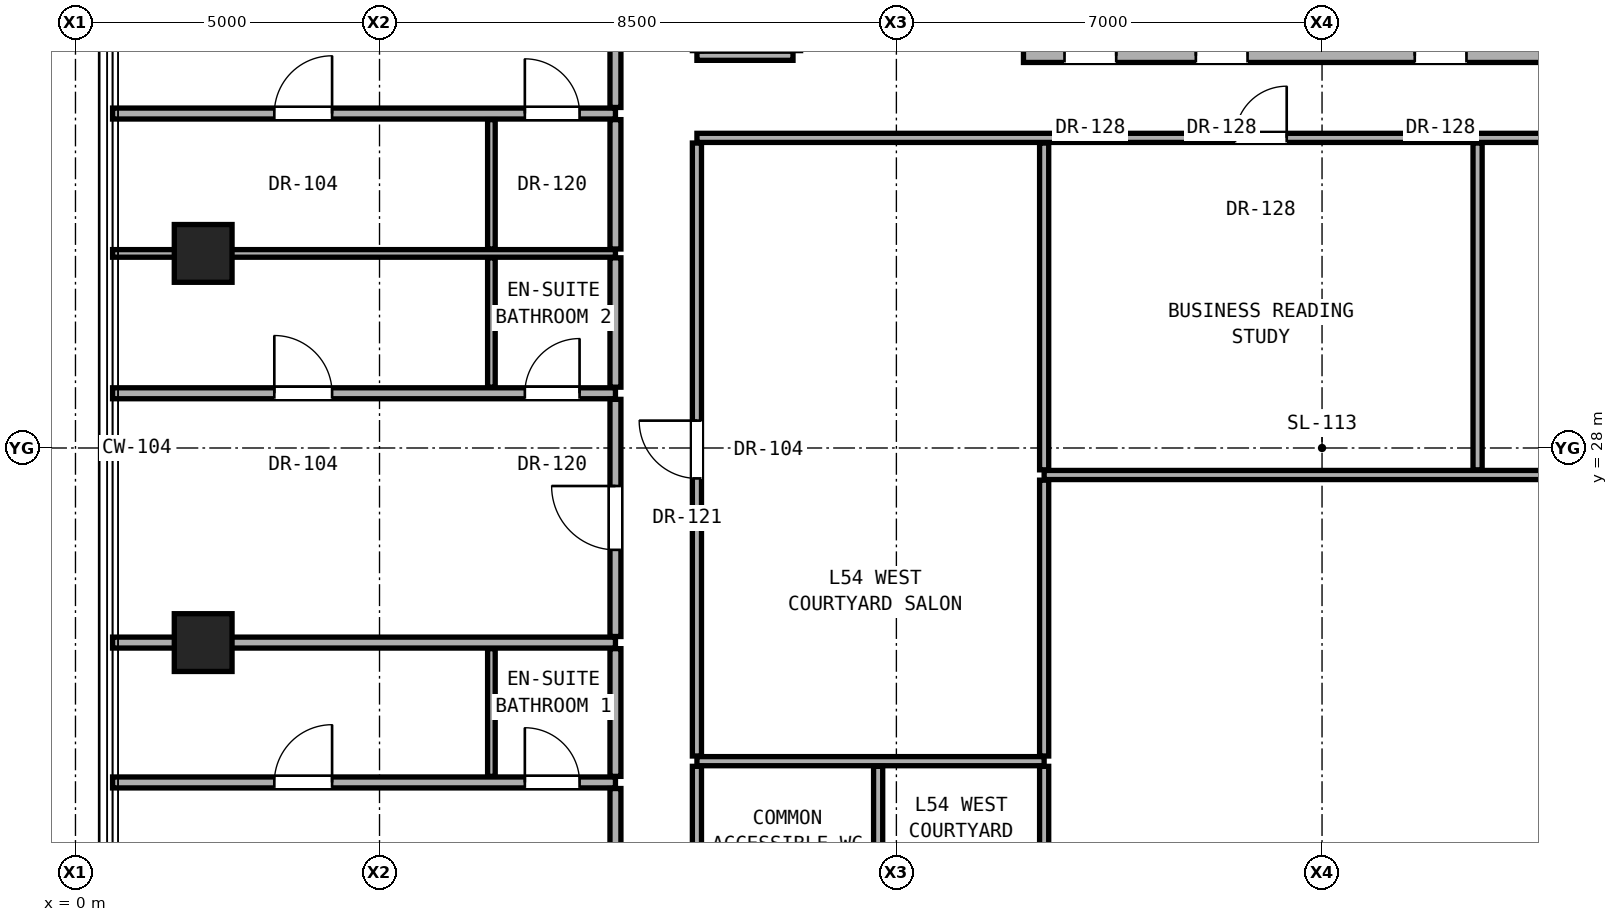
"""IFC4 building model, lengths in metres.
Left out: names, types, materials, properties, quantities, classifications, styles, units other than length and angle.
Written with IfcOpenShell. Run it as: python <this file> out.ifc"""

import sys

from ifc_helpers import new_model, si_unit, direction, frame, frame_2d, origin, origin_2d, place, context, subcontext, project, spatial, rectangle, hollow_rectangle, extrude, element, fill, save


model = new_model("IFC4")
c1 = context("Model", 3, precision=1e-05, world=origin(), true_north=direction((0.0, 1.0)))
c2 = subcontext(c1, "Body", "Model", "MODEL_VIEW")
j1 = project(units=[si_unit("LENGTHUNIT", "METRE"), si_unit("PLANEANGLEUNIT", "RADIAN")], contexts=[c1])
p1 = place(None, origin())
s1 = spatial("IfcSite", under=j1, at=p1, CompositionType="ELEMENT")
p2 = place(p1, origin())
s2 = spatial("IfcBuilding", under=s1, at=p2, CompositionType="ELEMENT")
p3 = place(p2, frame((0.0, 0.0, 190.15)))
s3 = spatial("IfcBuildingStorey", under=s2, at=p3, CompositionType="ELEMENT", Elevation=190.15)
for number, where, z_axis, x_axis in (
    (1, (2.1, 24.8, 0.0), (0.0, 0.0, 1.0), (1.0, 0.0, 0.0)),
    (2, (2.1, 31.2, 0.0), (0.0, 0.0, 1.0), (1.0, 0.0, 0.0)),
):
    element("IfcColumn", number, at=place(p3, frame(where, z_axis=z_axis, x_axis=x_axis)), inside=s3, PredefinedType="COLUMN", context=c2, shape_type="SweptSolid", body=[
        extrude(hollow_rectangle(XDim=0.95, YDim=0.95, WallThickness=0.05, at=origin_2d()), origin(), (0.0, 0.0, 1.0), 3.25),
    ])
p4 = place(p3, frame((0.61, 22.5, 0.0), z_axis=(0.0, 0.0, 1.0), x_axis=(1.0, 0.0, 0.0)))
e3 = element("IfcWall", 3, at=p4, inside=s3, PredefinedType="PARTITIONING", context=c2, shape_type="SweptSolid", body=[
    extrude(rectangle(XDim=8.27, YDim=0.18, at=frame_2d((4.135, 0.0))), origin(), (0.0, 0.0, 1.0), 2.269),
])
p5 = place(p4, frame((2.66, 0.0, 0.0)))
e4 = element("IfcOpeningElement", 4, at=p5, cuts=e3, PredefinedType="OPENING", context=c2, shape_type="SweptSolid", body=[
    extrude(rectangle(XDim=0.95, YDim=2.15, at=frame_2d((0.475, 1.075))), frame((0.0, 0.1, 0.0), z_axis=(0.0, -1.0, 0.0), x_axis=(1.0, 0.0, 0.0)), (0.0, 0.0, 1.0), 0.2),
])
p6 = place(p4, frame((6.78, 0.0, 0.0)))
e5 = element("IfcOpeningElement", 5, at=p6, cuts=e3, PredefinedType="OPENING", context=c2, shape_type="SweptSolid", body=[
    extrude(rectangle(XDim=0.9, YDim=2.1, at=frame_2d((0.45, 1.05))), frame((0.0, 0.1, 0.0), z_axis=(0.0, -1.0, 0.0), x_axis=(1.0, 0.0, 0.0)), (0.0, 0.0, 1.0), 0.2),
])
p7 = place(p3, frame((10.22, 22.85, 0.0), z_axis=(0.0, 0.0, 1.0), x_axis=(1.0, 0.0, 0.0)))
e6 = element("IfcWall", 6, at=p7, inside=s3, PredefinedType="PARTITIONING", context=c2, shape_type="SweptSolid", body=[
    extrude(rectangle(XDim=5.71, YDim=0.15, at=frame_2d((2.855, 0.0))), origin(), (0.0, 0.0, 1.0), 2.186),
])
p8 = place(p3, frame((0.61, 24.8, 0.0), z_axis=(0.0, 0.0, 1.0), x_axis=(1.0, 0.0, 0.0)))
e7 = element("IfcWall", 7, at=p8, inside=s3, PredefinedType="PARTITIONING", context=c2, shape_type="SweptSolid", body=[
    extrude(rectangle(XDim=8.27, YDim=0.18, at=frame_2d((4.135, 0.0))), origin(), (0.0, 0.0, 1.0), 2.269),
])
p9 = place(p3, frame((15.93, 27.556, 0.0), z_axis=(0.0, 0.0, 1.0), x_axis=(1.0, 0.0, 0.0)))
e8 = element("IfcWall", 8, at=p9, inside=s3, PredefinedType="PARTITIONING", context=c2, shape_type="SweptSolid", body=[
    extrude(rectangle(XDim=14.85, YDim=0.15, at=frame_2d((7.425, 0.0))), origin(), (0.0, 0.0, 1.0), 2.186),
])
p10 = place(p3, frame((0.61, 28.9, 0.0), z_axis=(0.0, 0.0, 1.0), x_axis=(1.0, 0.0, 0.0)))
e9 = element("IfcWall", 9, at=p10, inside=s3, PredefinedType="PARTITIONING", context=c2, shape_type="SweptSolid", body=[
    extrude(rectangle(XDim=8.27, YDim=0.18, at=frame_2d((4.135, 0.0))), origin(), (0.0, 0.0, 1.0), 2.269),
])
p11 = place(p10, frame((2.66, 0.0, 0.0)))
e10 = element("IfcOpeningElement", 10, at=p11, cuts=e9, PredefinedType="OPENING", context=c2, shape_type="SweptSolid", body=[
    extrude(rectangle(XDim=0.95, YDim=2.15, at=frame_2d((0.475, 1.075))), frame((0.0, 0.1, 0.0), z_axis=(0.0, -1.0, 0.0), x_axis=(1.0, 0.0, 0.0)), (0.0, 0.0, 1.0), 0.2),
])
p12 = place(p10, frame((6.78, 0.0, 0.0)))
e11 = element("IfcOpeningElement", 11, at=p12, cuts=e9, PredefinedType="OPENING", context=c2, shape_type="SweptSolid", body=[
    extrude(rectangle(XDim=0.9, YDim=2.1, at=frame_2d((0.45, 1.05))), frame((0.0, 0.1, 0.0), z_axis=(0.0, -1.0, 0.0), x_axis=(1.0, 0.0, 0.0)), (0.0, 0.0, 1.0), 0.2),
])
p13 = place(p3, frame((0.61, 31.2, 0.0), z_axis=(0.0, 0.0, 1.0), x_axis=(1.0, 0.0, 0.0)))
e12 = element("IfcWall", 12, at=p13, inside=s3, PredefinedType="PARTITIONING", context=c2, shape_type="SweptSolid", body=[
    extrude(rectangle(XDim=8.27, YDim=0.125, at=frame_2d((4.135, 0.0))), origin(), (0.0, 0.0, 1.0), 2.269),
])
p14 = place(p3, frame((10.22, 33.1, 0.0), z_axis=(0.0, 0.0, 1.0), x_axis=(1.0, 0.0, 0.0)))
e13 = element("IfcWall", 13, at=p14, inside=s3, PredefinedType="PARTITIONING", context=c2, shape_type="SweptSolid", body=[
    extrude(rectangle(XDim=20.56, YDim=0.15, at=frame_2d((10.28, 0.0))), origin(), (0.0, 0.0, 1.0), 2.186),
])
p15 = place(p14, frame((8.849, 0.0, 0.0)))
e14 = element("IfcOpeningElement", 14, at=p15, cuts=e13, PredefinedType="OPENING", context=c2, shape_type="SweptSolid", body=[
    extrude(rectangle(XDim=0.85, YDim=2.01, at=frame_2d((0.425, 1.005))), frame((0.0, 0.085, 0.0), z_axis=(0.0, -1.0, 0.0), x_axis=(1.0, 0.0, 0.0)), (0.0, 0.0, 1.0), 0.17),
])
p16 = place(p14, frame((16.254, 0.0, 0.0)))
e15 = element("IfcOpeningElement", 15, at=p16, cuts=e13, PredefinedType="OPENING", context=c2, shape_type="SweptSolid", body=[
    extrude(rectangle(XDim=0.85, YDim=2.01, at=frame_2d((0.425, 1.005))), frame((0.0, 0.085, 0.0), z_axis=(0.0, -1.0, 0.0), x_axis=(1.0, 0.0, 0.0)), (0.0, 0.0, 1.0), 0.17),
])
p17 = place(p3, frame((0.61, 33.5, 0.0), z_axis=(0.0, 0.0, 1.0), x_axis=(1.0, 0.0, 0.0)))
e16 = element("IfcWall", 16, at=p17, inside=s3, PredefinedType="PARTITIONING", context=c2, shape_type="SweptSolid", body=[
    extrude(rectangle(XDim=8.27, YDim=0.18, at=frame_2d((4.135, 0.0))), origin(), (0.0, 0.0, 1.0), 2.269),
])
p18 = place(p17, frame((2.66, 0.0, 0.0)))
e17 = element("IfcOpeningElement", 17, at=p18, cuts=e16, PredefinedType="OPENING", context=c2, shape_type="SweptSolid", body=[
    extrude(rectangle(XDim=0.95, YDim=2.15, at=frame_2d((0.475, 1.075))), frame((0.0, 0.1, 0.0), z_axis=(0.0, -1.0, 0.0), x_axis=(1.0, 0.0, 0.0)), (0.0, 0.0, 1.0), 0.2),
])
p19 = place(p17, frame((6.78, 0.0, 0.0)))
e18 = element("IfcOpeningElement", 18, at=p19, cuts=e16, PredefinedType="OPENING", context=c2, shape_type="SweptSolid", body=[
    extrude(rectangle(XDim=0.9, YDim=2.1, at=frame_2d((0.45, 1.05))), frame((0.0, 0.1, 0.0), z_axis=(0.0, -1.0, 0.0), x_axis=(1.0, 0.0, 0.0)), (0.0, 0.0, 1.0), 0.2),
])
p20 = place(p3, frame((10.22, 34.45, 0.0), z_axis=(0.0, 0.0, 1.0), x_axis=(1.0, 0.0, 0.0)))
e19 = element("IfcWall", 19, at=p20, inside=s3, PredefinedType="PARTITIONING", context=c2, shape_type="SweptSolid", body=[
    extrude(rectangle(XDim=1.58, YDim=0.15, at=frame_2d((0.79, 0.0))), origin(), (0.0, 0.0, 1.0), 2.186),
])
p21 = place(p3, frame((15.59, 34.45, 0.0), z_axis=(0.0, 0.0, 1.0), x_axis=(1.0, 0.0, 0.0)))
e20 = element("IfcWall", 20, at=p21, inside=s3, PredefinedType="SOLIDWALL", context=c2, shape_type="SweptSolid", body=[
    extrude(rectangle(XDim=15.19, YDim=0.22, at=frame_2d((7.595, 0.0))), origin(), (0.0, 0.0, 1.0), 2.186),
])
p22 = place(p21, frame((6.435, 0.0, 0.0)))
e21 = element("IfcOpeningElement", 21, at=p22, cuts=e20, PredefinedType="OPENING", context=c2, shape_type="SweptSolid", body=[
    extrude(rectangle(XDim=0.85, YDim=2.01, at=frame_2d((0.425, 1.005))), frame((0.0, 0.12, 0.0), z_axis=(0.0, -1.0, 0.0), x_axis=(1.0, 0.0, 0.0)), (0.0, 0.0, 1.0), 0.24),
])
p23 = place(p21, frame((9.96, 0.0, 0.0)))
e22 = element("IfcOpeningElement", 22, at=p23, cuts=e20, PredefinedType="OPENING", context=c2, shape_type="SweptSolid", body=[
    extrude(rectangle(XDim=0.95, YDim=2.15, at=frame_2d((0.475, 1.075))), frame((0.0, 0.12, 0.0), z_axis=(0.0, -1.0, 0.0), x_axis=(1.0, 0.0, 0.0)), (0.0, 0.0, 1.0), 0.24),
])
p24 = place(p21, frame((12.21, 0.0, 0.0)))
e23 = element("IfcOpeningElement", 23, at=p24, cuts=e20, PredefinedType="OPENING", context=c2, shape_type="SweptSolid", body=[
    extrude(rectangle(XDim=0.95, YDim=2.15, at=frame_2d((0.475, 1.075))), frame((0.0, 0.12, 0.0), z_axis=(0.0, -1.0, 0.0), x_axis=(1.0, 0.0, 0.0)), (0.0, 0.0, 1.0), 0.24),
])
p25 = place(p21, frame((0.675, 0.0, 0.0)))
e24 = element("IfcOpeningElement", 24, at=p25, cuts=e20, PredefinedType="OPENING", context=c2, shape_type="SweptSolid", body=[
    extrude(rectangle(XDim=0.85, YDim=2.01, at=frame_2d((0.425, 1.005))), frame((0.0, 0.12, 0.0), z_axis=(0.0, -1.0, 0.0), x_axis=(1.0, 0.0, 0.0)), (0.0, 0.0, 1.0), 0.24),
])
p26 = place(p21, frame((2.835, 0.0, 0.0)))
e25 = element("IfcOpeningElement", 25, at=p26, cuts=e20, PredefinedType="OPENING", context=c2, shape_type="SweptSolid", body=[
    extrude(rectangle(XDim=0.85, YDim=2.01, at=frame_2d((0.425, 1.005))), frame((0.0, 0.12, 0.0), z_axis=(0.0, -1.0, 0.0), x_axis=(1.0, 0.0, 0.0)), (0.0, 0.0, 1.0), 0.24),
])
p27 = place(p3, frame((6.84, 22.6, 0.0), z_axis=(0.0, 0.0, 1.0), x_axis=(0.0, 1.0, 0.0)))
e26 = element("IfcWall", 26, at=p27, inside=s3, PredefinedType="PARTITIONING", context=c2, shape_type="SweptSolid", body=[
    extrude(rectangle(XDim=2.1, YDim=0.125, at=frame_2d((1.05, 0.0))), origin(), (0.0, 0.0, 1.0), 2.346),
])
for number, where, z_axis, x_axis in (
    (27, (6.84, 29.0, 0.0), (0.0, 0.0, 1.0), (0.0, 1.0, 0.0)),
    (28, (6.84, 31.272, 0.0), (0.0, 0.0, 1.0), (0.0, 1.0, 0.0)),
):
    element("IfcWall", number, at=place(p3, frame(where, z_axis=z_axis, x_axis=x_axis)), inside=s3, PredefinedType="PARTITIONING", context=c2, shape_type="SweptSolid", body=[
        extrude(rectangle(XDim=2.127, YDim=0.125, at=frame_2d((1.064, 0.0))), origin(), (0.0, 0.0, 1.0), 2.346),
    ])
p28 = place(p3, frame((8.88, 15.129, 0.0), z_axis=(0.0, 0.0, 1.0), x_axis=(0.0, 1.0, 0.0)))
e29 = element("IfcWall", 29, at=p28, inside=s3, PredefinedType="PARTITIONING", context=c2, shape_type="SweptSolid", body=[
    extrude(rectangle(XDim=7.271, YDim=0.18, at=frame_2d((3.635, 0.0))), origin(), (0.0, 0.0, 1.0), 2.442),
])
p29 = place(p28, frame((3.111, 0.0, 0.0)))
e30 = element("IfcOpeningElement", 30, at=p29, cuts=e29, PredefinedType="OPENING", context=c2, shape_type="SweptSolid", body=[
    extrude(rectangle(XDim=1.05, YDim=2.2, at=frame_2d((0.525, 1.1))), frame((0.0, 0.1, 0.0), z_axis=(0.0, -1.0, 0.0), x_axis=(1.0, 0.0, 0.0)), (0.0, 0.0, 1.0), 0.2),
])
p30 = place(p3, frame((8.88, 22.6, 0.0), z_axis=(0.0, 0.0, 1.0), x_axis=(0.0, 1.0, 0.0)))
e31 = element("IfcWall", 31, at=p30, inside=s3, PredefinedType="PARTITIONING", context=c2, shape_type="SweptSolid", body=[
    extrude(rectangle(XDim=2.1, YDim=0.18, at=frame_2d((1.05, 0.0))), origin(), (0.0, 0.0, 1.0), 2.346),
])
p31 = place(p3, frame((8.88, 24.9, 0.0), z_axis=(0.0, 0.0, 1.0), x_axis=(0.0, 1.0, 0.0)))
e32 = element("IfcWall", 32, at=p31, inside=s3, PredefinedType="PARTITIONING", context=c2, shape_type="SweptSolid", body=[
    extrude(rectangle(XDim=3.9, YDim=0.18, at=frame_2d((1.95, 0.0))), origin(), (0.0, 0.0, 1.0), 2.346),
])
p32 = place(p31, frame((1.425, 0.0, 0.0)))
e33 = element("IfcOpeningElement", 33, at=p32, cuts=e32, PredefinedType="OPENING", context=c2, shape_type="SweptSolid", body=[
    extrude(rectangle(XDim=1.05, YDim=2.2, at=frame_2d((0.525, 1.1))), frame((0.0, 0.1, 0.0), z_axis=(0.0, -1.0, 0.0), x_axis=(1.0, 0.0, 0.0)), (0.0, 0.0, 1.0), 0.2),
])
for number, where, z_axis, x_axis in (
    (34, (8.88, 29.0, 0.0), (0.0, 0.0, 1.0), (0.0, 1.0, 0.0)),
    (35, (8.88, 31.272, 0.0), (0.0, 0.0, 1.0), (0.0, 1.0, 0.0)),
):
    element("IfcWall", number, at=place(p3, frame(where, z_axis=z_axis, x_axis=x_axis)), inside=s3, PredefinedType="PARTITIONING", context=c2, shape_type="SweptSolid", body=[
        extrude(rectangle(XDim=2.127, YDim=0.18, at=frame_2d((1.064, 0.0))), origin(), (0.0, 0.0, 1.0), 2.346),
    ])
p33 = place(p3, frame((8.88, 33.6, 0.0), z_axis=(0.0, 0.0, 1.0), x_axis=(0.0, 1.0, 0.0)))
e36 = element("IfcWall", 36, at=p33, inside=s3, PredefinedType="PARTITIONING", context=c2, shape_type="SweptSolid", body=[
    extrude(rectangle(XDim=7.271, YDim=0.18, at=frame_2d((3.635, 0.0))), origin(), (0.0, 0.0, 1.0), 2.442),
])
p34 = place(p33, frame((3.111, 0.0, 0.0)))
e37 = element("IfcOpeningElement", 37, at=p34, cuts=e36, PredefinedType="OPENING", context=c2, shape_type="SweptSolid", body=[
    extrude(rectangle(XDim=1.05, YDim=2.2, at=frame_2d((0.525, 1.1))), frame((0.0, 0.1, 0.0), z_axis=(0.0, -1.0, 0.0), x_axis=(1.0, 0.0, 0.0)), (0.0, 0.0, 1.0), 0.2),
])
p35 = place(p3, frame((10.22, 19.985, 0.0), z_axis=(0.0, 0.0, 1.0), x_axis=(0.0, 1.0, 0.0)))
e38 = element("IfcWall", 38, at=p35, inside=s3, PredefinedType="PARTITIONING", context=c2, shape_type="SweptSolid", body=[
    extrude(rectangle(XDim=2.78, YDim=0.15, at=frame_2d((1.39, 0.0))), origin(), (0.0, 0.0, 1.0), 3.05),
])
p36 = place(p3, frame((10.22, 22.935, 0.0), z_axis=(0.0, 0.0, 1.0), x_axis=(0.0, 1.0, 0.0)))
e39 = element("IfcWall", 39, at=p36, inside=s3, PredefinedType="PARTITIONING", context=c2, shape_type="SweptSolid", body=[
    extrude(rectangle(XDim=10.08, YDim=0.15, at=frame_2d((5.04, 0.0))), origin(), (0.0, 0.0, 1.0), 2.346),
])
p37 = place(p36, frame((4.565, 0.0, 0.0)))
e40 = element("IfcOpeningElement", 40, at=p37, cuts=e39, PredefinedType="OPENING", context=c2, shape_type="SweptSolid", body=[
    extrude(rectangle(XDim=0.95, YDim=2.15, at=frame_2d((0.475, 1.075))), frame((0.0, 0.085, 0.0), z_axis=(0.0, -1.0, 0.0), x_axis=(1.0, 0.0, 0.0)), (0.0, 0.0, 1.0), 0.17),
])
for number, where, z_axis, x_axis in (
    (41, (13.2, 19.985, 0.0), (0.0, 0.0, 1.0), (0.0, 1.0, 0.0)),
    (42, (15.93, 19.985, 0.0), (0.0, 0.0, 1.0), (0.0, 1.0, 0.0)),
):
    element("IfcWall", number, at=place(p3, frame(where, z_axis=z_axis, x_axis=x_axis)), inside=s3, PredefinedType="PARTITIONING", context=c2, shape_type="SweptSolid", body=[
        extrude(rectangle(XDim=2.78, YDim=0.15, at=frame_2d((1.39, 0.0))), origin(), (0.0, 0.0, 1.0), 3.05),
    ])
p38 = place(p3, frame((15.93, 22.935, 0.0), z_axis=(0.0, 0.0, 1.0), x_axis=(0.0, 1.0, 0.0)))
e43 = element("IfcWall", 43, at=p38, inside=s3, PredefinedType="PARTITIONING", context=c2, shape_type="SweptSolid", body=[
    extrude(rectangle(XDim=4.536, YDim=0.15, at=frame_2d((2.268, 0.0))), origin(), (0.0, 0.0, 1.0), 2.186),
])
for number, where, z_axis, x_axis in (
    (44, (15.93, 27.641, 0.0), (0.0, 0.0, 1.0), (0.0, 1.0, 0.0)),
    (45, (23.058, 27.641, 0.0), (0.0, 0.0, 1.0), (0.0, 1.0, 0.0)),
):
    element("IfcWall", number, at=place(p3, frame(where, z_axis=z_axis, x_axis=x_axis)), inside=s3, PredefinedType="PARTITIONING", context=c2, shape_type="SweptSolid", body=[
        extrude(rectangle(XDim=5.374, YDim=0.15, at=frame_2d((2.687, 0.0))), origin(), (0.0, 0.0, 1.0), 2.186),
    ])
p39 = place(p22, origin())
e46 = element("IfcDoor", 46, at=p39, inside=s3, OperationType="SINGLE_SWING_LEFT", PredefinedType="DOOR", context=c2, shape_type="SweptSolid", body=[
    extrude(rectangle(XDim=0.85, YDim=2.01, at=frame_2d((0.425, 1.005))), frame((0.0, 0.025, 0.0), z_axis=(0.0, -1.0, 0.0), x_axis=(1.0, 0.0, 0.0)), (0.0, 0.0, 1.0), 0.05),
])
fill(e21, e46)
p40 = place(p25, origin())
e47 = element("IfcDoor", 47, at=p40, inside=s3, OperationType="SINGLE_SWING_RIGHT", PredefinedType="DOOR", context=c2, shape_type="SweptSolid", body=[
    extrude(rectangle(XDim=0.85, YDim=2.01, at=frame_2d((0.425, 1.005))), frame((0.0, 0.025, 0.0), z_axis=(0.0, -1.0, 0.0), x_axis=(1.0, 0.0, 0.0)), (0.0, 0.0, 1.0), 0.05),
])
fill(e24, e47)
p41 = place(p26, origin())
e48 = element("IfcDoor", 48, at=p41, inside=s3, OperationType="SINGLE_SWING_LEFT", PredefinedType="DOOR", context=c2, shape_type="SweptSolid", body=[
    extrude(rectangle(XDim=0.85, YDim=2.01, at=frame_2d((0.425, 1.005))), frame((0.0, 0.025, 0.0), z_axis=(0.0, -1.0, 0.0), x_axis=(1.0, 0.0, 0.0)), (0.0, 0.0, 1.0), 0.05),
])
fill(e25, e48)
p42 = place(p5, origin())
e49 = element("IfcDoor", 49, at=p42, inside=s3, OperationType="SINGLE_SWING_RIGHT", PredefinedType="DOOR", context=c2, shape_type="SweptSolid", body=[
    extrude(rectangle(XDim=0.95, YDim=2.15, at=frame_2d((0.475, 1.075))), frame((0.0, 0.025, 0.0), z_axis=(0.0, -1.0, 0.0), x_axis=(1.0, 0.0, 0.0)), (0.0, 0.0, 1.0), 0.05),
])
fill(e4, e49)
p43 = place(p6, origin())
e50 = element("IfcDoor", 50, at=p43, inside=s3, OperationType="SINGLE_SWING_LEFT", PredefinedType="DOOR", context=c2, shape_type="SweptSolid", body=[
    extrude(rectangle(XDim=0.9, YDim=2.1, at=frame_2d((0.45, 1.05))), frame((0.0, 0.025, 0.0), z_axis=(0.0, -1.0, 0.0), x_axis=(1.0, 0.0, 0.0)), (0.0, 0.0, 1.0), 0.05),
])
fill(e5, e50)
p44 = place(p32, origin())
e51 = element("IfcDoor", 51, at=p44, inside=s3, OperationType="SINGLE_SWING_RIGHT", PredefinedType="DOOR", context=c2, shape_type="SweptSolid", body=[
    extrude(rectangle(XDim=1.05, YDim=2.2, at=frame_2d((0.525, 1.1))), frame((0.0, 0.025, 0.0), z_axis=(0.0, -1.0, 0.0), x_axis=(1.0, 0.0, 0.0)), (0.0, 0.0, 1.0), 0.05),
])
fill(e33, e51)
p45 = place(p11, origin())
e52 = element("IfcDoor", 52, at=p45, inside=s3, OperationType="SINGLE_SWING_LEFT", PredefinedType="DOOR", context=c2, shape_type="SweptSolid", body=[
    extrude(rectangle(XDim=0.95, YDim=2.15, at=frame_2d((0.475, 1.075))), frame((0.0, 0.025, 0.0), z_axis=(0.0, -1.0, 0.0), x_axis=(1.0, 0.0, 0.0)), (0.0, 0.0, 1.0), 0.05),
])
fill(e10, e52)
p46 = place(p12, origin())
e53 = element("IfcDoor", 53, at=p46, inside=s3, OperationType="SINGLE_SWING_RIGHT", PredefinedType="DOOR", context=c2, shape_type="SweptSolid", body=[
    extrude(rectangle(XDim=0.9, YDim=2.1, at=frame_2d((0.45, 1.05))), frame((0.0, 0.025, 0.0), z_axis=(0.0, -1.0, 0.0), x_axis=(1.0, 0.0, 0.0)), (0.0, 0.0, 1.0), 0.05),
])
fill(e11, e53)
p47 = place(p18, origin())
e54 = element("IfcDoor", 54, at=p47, inside=s3, OperationType="SINGLE_SWING_RIGHT", PredefinedType="DOOR", context=c2, shape_type="SweptSolid", body=[
    extrude(rectangle(XDim=0.95, YDim=2.15, at=frame_2d((0.475, 1.075))), frame((0.0, 0.025, 0.0), z_axis=(0.0, -1.0, 0.0), x_axis=(1.0, 0.0, 0.0)), (0.0, 0.0, 1.0), 0.05),
])
fill(e17, e54)
p48 = place(p19, origin())
e55 = element("IfcDoor", 55, at=p48, inside=s3, OperationType="SINGLE_SWING_LEFT", PredefinedType="DOOR", context=c2, shape_type="SweptSolid", body=[
    extrude(rectangle(XDim=0.9, YDim=2.1, at=frame_2d((0.45, 1.05))), frame((0.0, 0.025, 0.0), z_axis=(0.0, -1.0, 0.0), x_axis=(1.0, 0.0, 0.0)), (0.0, 0.0, 1.0), 0.05),
])
fill(e18, e55)
p49 = place(p37, origin())
e56 = element("IfcDoor", 56, at=p49, inside=s3, OperationType="SINGLE_SWING_RIGHT", PredefinedType="DOOR", context=c2, shape_type="SweptSolid", body=[
    extrude(rectangle(XDim=0.95, YDim=2.15, at=frame_2d((0.475, 1.075))), frame((0.0, 0.025, 0.0), z_axis=(0.0, -1.0, 0.0), x_axis=(1.0, 0.0, 0.0)), (0.0, 0.0, 1.0), 0.05),
])
fill(e40, e56)
p50 = place(p15, origin())
e57 = element("IfcDoor", 57, at=p50, inside=s3, OperationType="SINGLE_SWING_RIGHT", PredefinedType="DOOR", context=c2, shape_type="SweptSolid", body=[
    extrude(rectangle(XDim=0.85, YDim=2.01, at=frame_2d((0.425, 1.005))), frame((0.0, 0.025, 0.0), z_axis=(0.0, -1.0, 0.0), x_axis=(1.0, 0.0, 0.0)), (0.0, 0.0, 1.0), 0.05),
])
fill(e14, e57)
save(model, sys.argv[1])
